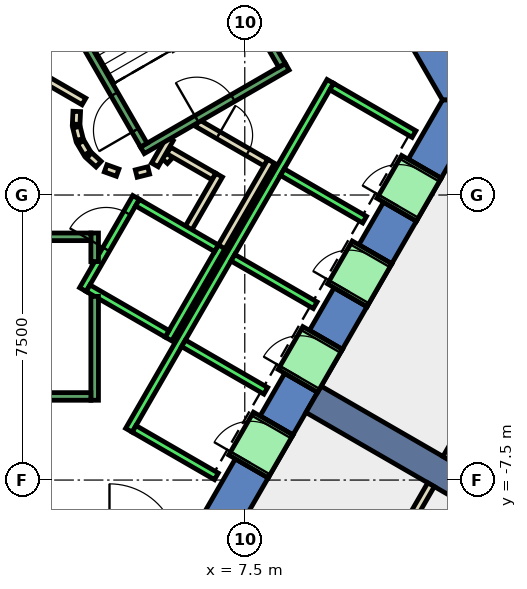
"""IFC4 building model, lengths in metres.
Left out: names, types, materials, properties, quantities, classifications, styles, units other than length and angle.
Written with IfcOpenShell. Run it as: python <this file> out.ifc"""

import sys

from ifc_helpers import new_model, si_unit, direction, frame, frame_2d, origin, place, context, subcontext, project, spatial, polyline, rectangle, outline, extrude, element, fill, save


model = new_model("IFC4")
c1 = context("Model", 3, precision=1e-05, world=origin(), true_north=direction((0.0, 1.0)))
c2 = subcontext(c1, "Body", "Model", "MODEL_VIEW")
j1 = project(units=[si_unit("LENGTHUNIT", "METRE"), si_unit("PLANEANGLEUNIT", "RADIAN")], contexts=[c1])
p1 = place(None, origin())
s1 = spatial("IfcSite", under=j1, at=p1, CompositionType="ELEMENT")
p2 = place(p1, origin())
s2 = spatial("IfcBuilding", under=s1, at=p2, CompositionType="ELEMENT")
p3 = place(p2, frame((0.0, 0.0, 68.6)))
s3 = spatial("IfcBuildingStorey", under=s2, at=p3, CompositionType="ELEMENT", Elevation=68.6)
p4 = place(p3, frame((0.0, 0.0, -0.4)))
e1 = element("IfcWall", 1, at=p4, inside=s3, PredefinedType="SHEAR", context=c2, shape_type="SweptSolid", body=[
    extrude(outline(polyline([(8.517, 11.748), (7.651, 11.248), (12.702, 2.5), (13.856, 2.5), (8.517, 11.748)])), origin(), (0.0, 0.0, 1.0), 4.2),
])
p5 = place(p3, frame((0.0, 0.0, -0.4)))
e2 = element("IfcWall", 2, at=p5, inside=s3, PredefinedType="SHEAR", context=c2, shape_type="SweptSolid", body=[
    extrude(outline(polyline([(8.117, -7.44), (7.252, -6.94), (6.351, -8.5), (6.928, -9.5), (8.117, -7.44)])), origin(), (0.0, 0.0, 1.0), 4.2),
])
p6 = place(p3, frame((0.0, 0.0, -0.4)))
e3 = element("IfcWall", 3, at=p6, inside=s3, PredefinedType="SHEAR", context=c2, shape_type="SweptSolid", body=[
    extrude(outline(polyline([(9.417, -5.189), (8.551, -4.689), (7.902, -5.814), (8.767, -6.314), (9.417, -5.189)])), origin(), (0.0, 0.0, 1.0), 4.2),
])
p7 = place(p3, frame((0.0, 0.0, -0.4)))
e4 = element("IfcWall", 4, at=p7, inside=s3, PredefinedType="SHEAR", context=c2, shape_type="SweptSolid", body=[
    extrude(outline(polyline([(10.717, -2.937), (9.851, -2.437), (9.201, -3.563), (10.067, -4.063), (10.717, -2.937)])), origin(), (0.0, 0.0, 1.0), 4.2),
])
p8 = place(p3, frame((0.0, 0.0, -0.4)))
e5 = element("IfcWall", 5, at=p8, inside=s3, PredefinedType="SHEAR", context=c2, shape_type="SweptSolid", body=[
    extrude(outline(polyline([(12.017, -0.686), (11.151, -0.186), (10.501, -1.311), (11.367, -1.811), (12.017, -0.686)])), origin(), (0.0, 0.0, 1.0), 4.2),
])
p9 = place(p3, frame((0.0, 0.0, -0.4)))
e6 = element("IfcWall", 6, at=p9, inside=s3, PredefinedType="SHEAR", context=c2, shape_type="SweptSolid", body=[
    extrude(outline(polyline([(11.801, 0.94), (12.667, 0.44), (13.856, 2.5), (12.702, 2.5), (11.801, 0.94)])), origin(), (0.0, 0.0, 1.0), 4.2),
])
p10 = place(p3, frame((0.0, 0.0, 3.6)))
e7 = element("IfcWall", 7, at=p10, inside=s3, PredefinedType="SHEAR", context=c2, shape_type="SweptSolid", body=[
    extrude(outline(polyline([(8.767, -6.314), (7.902, -5.814), (7.252, -6.94), (8.117, -7.44), (8.767, -6.314)])), origin(), (0.0, 0.0, 1.0), 0.2),
])
p11 = place(p3, frame((0.0, 0.0, 3.6)))
e8 = element("IfcWall", 8, at=p11, inside=s3, PredefinedType="SHEAR", context=c2, shape_type="SweptSolid", body=[
    extrude(outline(polyline([(10.067, -4.063), (9.201, -3.563), (8.551, -4.689), (9.417, -5.189), (10.067, -4.063)])), origin(), (0.0, 0.0, 1.0), 0.2),
])
p12 = place(p3, frame((0.0, 0.0, 3.6)))
e9 = element("IfcWall", 9, at=p12, inside=s3, PredefinedType="SHEAR", context=c2, shape_type="SweptSolid", body=[
    extrude(outline(polyline([(11.367, -1.811), (10.501, -1.311), (9.851, -2.437), (10.717, -2.937), (11.367, -1.811)])), origin(), (0.0, 0.0, 1.0), 0.2),
])
p13 = place(p3, frame((0.0, 0.0, 3.6)))
e10 = element("IfcWall", 10, at=p13, inside=s3, PredefinedType="SHEAR", context=c2, shape_type="SweptSolid", body=[
    extrude(outline(polyline([(12.667, 0.44), (11.801, 0.94), (11.151, -0.186), (12.017, -0.686), (12.667, 0.44)])), origin(), (0.0, 0.0, 1.0), 0.2),
])
p14 = place(p3, frame((9.31, -5.375, -0.4), z_axis=(0.0, 0.0, 1.0), x_axis=(0.866017533419, -0.500013631625, 0.0)))
e11 = element("IfcWall", 11, at=p14, inside=s3, PredefinedType="SHEAR", context=c2, shape_type="SweptSolid", body=[
    extrude(rectangle(XDim=9.0, YDim=0.8, at=frame_2d((4.5, 0.0))), origin(), (0.0, 0.0, 1.0), 4.2),
])
p15 = place(p3, frame((5.39, 0.898, 0.0), z_axis=(0.0, 0.0, 1.0), x_axis=(0.673828488714, 0.738887791073, 0.0)))
e12 = element("IfcWall", 12, at=p15, inside=s3, PredefinedType="PARTITIONING", context=c2, shape_type="SweptSolid", body=[
    extrude(rectangle(XDim=0.263, YDim=0.2, at=frame_2d((0.131, 0.0))), origin(), (0.0, 0.0, 1.0), 3.8),
])
p16 = place(p3, frame((5.499, 1.172, 0.0), z_axis=(0.0, 0.0, 1.0), x_axis=(0.866333505267, -0.499465972466, 0.0)))
e13 = element("IfcWall", 13, at=p16, inside=s3, PredefinedType="PARTITIONING", context=c2, shape_type="SweptSolid", body=[
    extrude(rectangle(XDim=1.374, YDim=0.2, at=frame_2d((0.687, 0.0))), origin(), (0.0, 0.0, 1.0), 3.8),
])
p17 = place(p3, frame((6.826, 0.522, 0.0), z_axis=(0.0, 0.0, 1.0), x_axis=(-0.500016722714, -0.866015748706, 0.0)))
e14 = element("IfcWall", 14, at=p17, inside=s3, PredefinedType="PARTITIONING", context=c2, shape_type="SweptSolid", body=[
    extrude(rectangle(XDim=1.7, YDim=0.2, at=frame_2d((0.85, 0.0))), origin(), (0.0, 0.0, 1.0), 3.8),
])
p18 = place(p3, frame((6.25, 1.894, 0.0), z_axis=(0.0, 0.0, 1.0), x_axis=(0.866043184279, -0.499969202016, 0.0)))
e15 = element("IfcWall", 15, at=p18, inside=s3, PredefinedType="PARTITIONING", context=c2, shape_type="SweptSolid", body=[
    extrude(rectangle(XDim=2.084, YDim=0.2, at=frame_2d((1.042, 0.0))), origin(), (0.0, 0.0, 1.0), 3.8),
])
p19 = place(p18, frame((0.642, 0.0, 0.0)))
e16 = element("IfcOpeningElement", 16, at=p19, cuts=e15, PredefinedType="OPENING", context=c2, shape_type="SweptSolid", body=[
    extrude(rectangle(XDim=0.9, YDim=2.1, at=frame_2d((0.45, 1.05))), frame((0.0, 0.11, 0.0), z_axis=(0.0, -1.0, 0.0), x_axis=(1.0, 0.0, 0.0)), (0.0, 0.0, 1.0), 0.22),
])
p20 = place(p3, frame((8.192, 0.888, 0.0), z_axis=(0.0, 0.0, 1.0), x_axis=(-0.499940625693, -0.866059680843, 0.0)))
e17 = element("IfcWall", 17, at=p20, inside=s3, PredefinedType="PARTITIONING", context=c2, shape_type="SweptSolid", body=[
    extrude(rectangle(XDim=2.68, YDim=0.2, at=frame_2d((1.34, 0.0))), origin(), (0.0, 0.0, 1.0), 3.8),
])
p21 = place(p3, frame((5.135, 0.793, 0.0), z_axis=(0.0, 0.0, 1.0), x_axis=(0.499526442893, 0.866298639529, 0.0)))
e18 = element("IfcWall", 18, at=p21, inside=s3, PredefinedType="PARTITIONING", context=c2, shape_type="SweptSolid", body=[
    extrude(rectangle(XDim=0.791, YDim=0.2, at=frame_2d((0.396, 0.0))), origin(), (0.0, 0.0, 1.0), 3.8),
])
p22 = place(p3, frame((2.012, 3.186, 0.0), z_axis=(0.0, 0.0, 1.0), x_axis=(0.865891012941, -0.500232699559, 0.0)))
e19 = element("IfcWall", 19, at=p22, inside=s3, PredefinedType="PARTITIONING", context=c2, shape_type="SweptSolid", body=[
    extrude(rectangle(XDim=1.449, YDim=0.2, at=frame_2d((0.725, 0.0))), origin(), (0.0, 0.0, 1.0), 3.8),
])
p23 = place(p3, frame((3.079, 2.199, 0.0), z_axis=(0.0, 0.0, 1.0), x_axis=(-0.047771483479, -0.998858290933, 0.0)))
e20 = element("IfcWall", 20, at=p23, inside=s3, PredefinedType="PARTITIONING", context=c2, shape_type="SweptSolid", body=[
    extrude(rectangle(XDim=0.337, YDim=0.2, at=frame_2d((0.169, 0.0))), origin(), (0.0, 0.0, 1.0), 3.8),
])
p24 = place(p3, frame((3.07, 1.786, 0.0), z_axis=(0.0, 0.0, 1.0), x_axis=(0.242705583207, -0.970099994784, 0.0)))
e21 = element("IfcWall", 21, at=p24, inside=s3, PredefinedType="PARTITIONING", context=c2, shape_type="SweptSolid", body=[
    extrude(rectangle(XDim=0.338, YDim=0.2, at=frame_2d((0.169, 0.0))), origin(), (0.0, 0.0, 1.0), 3.8),
])
for number, where, z_axis, x_axis in (
    (22, (3.182, 1.388, 0.0), (0.0, 0.0, 1.0), (0.512, -0.859, 0.0)),
    (23, (3.404, 1.039, 0.0), (0.0, 0.0, 1.0), (0.74, -0.672, 0.0)),
):
    element("IfcWall", number, at=place(p3, frame(where, z_axis=z_axis, x_axis=x_axis)), inside=s3, PredefinedType="PARTITIONING", context=c2, shape_type="SweptSolid", body=[
        extrude(rectangle(XDim=0.338, YDim=0.2, at=frame_2d((0.169, 0.0))), origin(), (0.0, 0.0, 1.0), 3.8),
    ])
p25 = place(p3, frame((3.838, 0.702, 0.0), z_axis=(0.0, 0.0, 1.0), x_axis=(0.941035081519, -0.338308993895, 0.0)))
e24 = element("IfcWall", 24, at=p25, inside=s3, PredefinedType="PARTITIONING", context=c2, shape_type="SweptSolid", body=[
    extrude(rectangle(XDim=0.337, YDim=0.2, at=frame_2d((0.168, 0.0))), origin(), (0.0, 0.0, 1.0), 3.8),
])
p26 = place(p3, frame((4.644, 0.564, 0.0), z_axis=(0.0, 0.0, 1.0), x_axis=(0.969929076366, 0.243387729394, 0.0)))
e25 = element("IfcWall", 25, at=p26, inside=s3, PredefinedType="PARTITIONING", context=c2, shape_type="SweptSolid", body=[
    extrude(rectangle(XDim=0.337, YDim=0.2, at=frame_2d((0.168, 0.0))), origin(), (0.0, 0.0, 1.0), 3.8),
])
p27 = place(p3, frame((19.81, 5.211, 0.0), z_axis=(0.0, 0.0, 1.0), x_axis=(-0.500003368273, -0.866023459102, 0.0)))
e26 = element("IfcWall", 26, at=p27, inside=s3, PredefinedType="PARTITIONING", context=c2, shape_type="SweptSolid", body=[
    extrude(rectangle(XDim=14.018, YDim=0.2, at=frame_2d((7.009, 0.0))), origin(), (0.0, 0.0, 1.0), 3.8),
])
p28 = place(p3, frame((12.401, -7.622, 0.0), z_axis=(0.0, 0.0, 1.0), x_axis=(-0.500029185841, -0.866008552675, 0.0)))
e27 = element("IfcWall", 27, at=p28, inside=s3, PredefinedType="PARTITIONING", context=c2, shape_type="SweptSolid", body=[
    extrude(rectangle(XDim=9.301, YDim=0.2, at=frame_2d((4.651, 0.0))), origin(), (0.0, 0.0, 1.0), 3.8),
])
p29 = place(p3, frame((3.24, -2.488, 0.0), z_axis=(0.0, 0.0, 1.0), x_axis=(0.49994636267, 0.866056369097, 0.0)))
e28 = element("IfcWall", 28, at=p29, inside=s3, PredefinedType="STANDARD", context=c2, shape_type="SweptSolid", body=[
    extrude(rectangle(XDim=2.8, YDim=0.2, at=frame_2d((1.4, 0.0))), origin(), (0.0, 0.0, 1.0), 3.8),
])
p30 = place(p29, frame((1.225, 0.0, 0.0)))
e29 = element("IfcOpeningElement", 29, at=p30, cuts=e28, PredefinedType="OPENING", context=c2, shape_type="SweptSolid", body=[
    extrude(rectangle(XDim=1.1, YDim=2.1, at=frame_2d((0.55, 1.05))), frame((0.0, 0.11, 0.0), z_axis=(0.0, -1.0, 0.0), x_axis=(1.0, 0.0, 0.0)), (0.0, 0.0, 1.0), 0.22),
])
p31 = place(p3, frame((5.492, -3.788, 0.0), z_axis=(0.0, 0.0, 1.0), x_axis=(0.500011755427, 0.866018616679, 0.0)))
e30 = element("IfcWall", 30, at=p31, inside=s3, PredefinedType="STANDARD", context=c2, shape_type="SweptSolid", body=[
    extrude(rectangle(XDim=2.8, YDim=0.2, at=frame_2d((1.4, 0.0))), origin(), (0.0, 0.0, 1.0), 3.8),
])
p32 = place(p3, frame((3.377, -2.452, 0.0), z_axis=(0.0, 0.0, 1.0), x_axis=(0.865955154139, -0.50012165622, 0.0)))
e31 = element("IfcWall", 31, at=p32, inside=s3, PredefinedType="STANDARD", context=c2, shape_type="SweptSolid", body=[
    extrude(rectangle(XDim=2.4, YDim=0.2, at=frame_2d((1.2, 0.0))), origin(), (0.0, 0.0, 1.0), 3.8),
])
p33 = place(p3, frame((4.677, -0.2, 0.0), z_axis=(0.0, 0.0, 1.0), x_axis=(0.865973769406, -0.500089422704, 0.0)))
e32 = element("IfcWall", 32, at=p33, inside=s3, PredefinedType="STANDARD", context=c2, shape_type="SweptSolid", body=[
    extrude(rectangle(XDim=2.399, YDim=0.2, at=frame_2d((1.2, 0.0))), origin(), (0.0, 0.0, 1.0), 3.8),
])
p34 = place(p3, frame((4.451, -6.19, 0.0), z_axis=(0.0, 0.0, 1.0), x_axis=(0.50000090737, 0.866024879913, 0.0)))
e33 = element("IfcWall", 33, at=p34, inside=s3, PredefinedType="STANDARD", context=c2, shape_type="SweptSolid", body=[
    extrude(rectangle(XDim=10.6, YDim=0.2, at=frame_2d((5.3, 0.0))), origin(), (0.0, 0.0, 1.0), 3.8),
])
for number, where, z_axis, x_axis in (
    (34, (4.588, -6.153, 0.0), (0.0, 0.0, 1.0), (0.866, -0.5, 0.0)),
    (35, (5.888, -3.902, 0.0), (0.0, 0.0, 1.0), (0.866, -0.5, 0.0)),
    (36, (7.188, -1.65, 0.0), (0.0, 0.0, 1.0), (0.866, -0.5, 0.0)),
    (37, (8.488, 0.602, 0.0), (0.0, 0.0, 1.0), (0.866, -0.5, 0.0)),
):
    element("IfcWall", number, at=place(p3, frame(where, z_axis=z_axis, x_axis=x_axis)), inside=s3, PredefinedType="STANDARD", context=c2, shape_type="SweptSolid", body=[
        extrude(rectangle(XDim=2.5, YDim=0.2, at=frame_2d((1.25, 0.0))), origin(), (0.0, 0.0, 1.0), 3.8),
    ])
p35 = place(p3, frame((9.788, 2.853, 0.0), z_axis=(0.0, 0.0, 1.0), x_axis=(0.865998541277, -0.500046524342, 0.0)))
e38 = element("IfcWall", 38, at=p35, inside=s3, PredefinedType="STANDARD", context=c2, shape_type="SweptSolid", body=[
    extrude(rectangle(XDim=2.5, YDim=0.2, at=frame_2d((1.25, 0.0))), origin(), (0.0, 0.0, 1.0), 3.8),
])
p36 = place(p3, frame((7.598, -7.14, 0.0), z_axis=(0.0, 0.0, 1.0), x_axis=(0.500362116554, 0.865816234728, 0.0)))
e39 = element("IfcWall", 39, at=p36, inside=s3, PredefinedType="STANDARD", context=c2, shape_type="SweptSolid", body=[
    extrude(rectangle(XDim=1.299, YDim=1.2, at=frame_2d((0.65, 0.0))), origin(), (0.0, 0.0, 1.0), 2.4),
])
p37 = place(p36, frame((0.1, 0.0, 0.0)))
e40 = element("IfcOpeningElement", 40, at=p37, cuts=e39, PredefinedType="OPENING", context=c2, shape_type="SweptSolid", body=[
    extrude(rectangle(XDim=1.1, YDim=2.3, at=frame_2d((0.55, 1.15))), frame((0.0, 0.61, 0.0), z_axis=(0.0, -1.0, 0.0), x_axis=(1.0, 0.0, 0.0)), (0.0, 0.0, 1.0), 1.22),
])
p38 = place(p3, frame((8.898, -4.889, 0.0), z_axis=(0.0, 0.0, 1.0), x_axis=(0.500036693733, 0.866004217611, 0.0)))
e41 = element("IfcWall", 41, at=p38, inside=s3, PredefinedType="STANDARD", context=c2, shape_type="SweptSolid", body=[
    extrude(rectangle(XDim=1.3, YDim=1.2, at=frame_2d((0.65, 0.0))), origin(), (0.0, 0.0, 1.0), 2.4),
])
p39 = place(p38, frame((0.1, 0.0, 0.0)))
e42 = element("IfcOpeningElement", 42, at=p39, cuts=e41, PredefinedType="OPENING", context=c2, shape_type="SweptSolid", body=[
    extrude(rectangle(XDim=1.1, YDim=2.3, at=frame_2d((0.55, 1.15))), frame((0.0, 0.61, 0.0), z_axis=(0.0, -1.0, 0.0), x_axis=(1.0, 0.0, 0.0)), (0.0, 0.0, 1.0), 1.22),
])
p40 = place(p3, frame((10.198, -2.637, 0.0), z_axis=(0.0, 0.0, 1.0), x_axis=(0.49989585183, 0.866085525409, 0.0)))
e43 = element("IfcWall", 43, at=p40, inside=s3, PredefinedType="STANDARD", context=c2, shape_type="SweptSolid", body=[
    extrude(rectangle(XDim=1.3, YDim=1.2, at=frame_2d((0.65, 0.0))), origin(), (0.0, 0.0, 1.0), 2.4),
])
p41 = place(p40, frame((0.1, 0.0, 0.0)))
e44 = element("IfcOpeningElement", 44, at=p41, cuts=e43, PredefinedType="OPENING", context=c2, shape_type="SweptSolid", body=[
    extrude(rectangle(XDim=1.1, YDim=2.3, at=frame_2d((0.55, 1.15))), frame((0.0, 0.61, 0.0), z_axis=(0.0, -1.0, 0.0), x_axis=(1.0, 0.0, 0.0)), (0.0, 0.0, 1.0), 1.22),
])
p42 = place(p3, frame((11.498, -0.385, 0.0), z_axis=(0.0, 0.0, 1.0), x_axis=(0.500221244143, 0.865897630733, 0.0)))
e45 = element("IfcWall", 45, at=p42, inside=s3, PredefinedType="STANDARD", context=c2, shape_type="SweptSolid", body=[
    extrude(rectangle(XDim=1.299, YDim=1.2, at=frame_2d((0.65, 0.0))), origin(), (0.0, 0.0, 1.0), 2.4),
])
p43 = place(p42, frame((0.1, 0.0, 0.0)))
e46 = element("IfcOpeningElement", 46, at=p43, cuts=e45, PredefinedType="OPENING", context=c2, shape_type="SweptSolid", body=[
    extrude(rectangle(XDim=1.1, YDim=2.3, at=frame_2d((0.55, 1.15))), frame((0.0, 0.61, 0.0), z_axis=(0.0, -1.0, 0.0), x_axis=(1.0, 0.0, 0.0)), (0.0, 0.0, 1.0), 1.22),
])
p44 = place(p3, frame((3.55, -2.667, 0.0), z_axis=(0.0, 0.0, 1.0), x_axis=(0.0, -1.0, 0.0)))
e47 = element("IfcWall", 47, at=p44, inside=s3, PredefinedType="STANDARD", context=c2, shape_type="SweptSolid", body=[
    extrude(rectangle(XDim=2.733, YDim=0.2, at=frame_2d((1.366, 0.0))), origin(), (0.0, 0.0, 1.0), 3.8),
])
p45 = place(p3, frame((3.55, -1.0, 0.0), z_axis=(0.0, 0.0, 1.0), x_axis=(0.0, -1.0, 0.0)))
e48 = element("IfcWall", 48, at=p45, inside=s3, PredefinedType="STANDARD", context=c2, shape_type="SweptSolid", body=[
    extrude(rectangle(XDim=0.751, YDim=0.2, at=frame_2d((0.375, 0.0))), origin(), (0.0, 0.0, 1.0), 3.8),
])
p46 = place(p3, frame((-3.45, -1.1, 0.0), z_axis=(0.0, 0.0, 1.0), x_axis=(1.0, 0.0, 0.0)))
e49 = element("IfcWall", 49, at=p46, inside=s3, PredefinedType="STANDARD", context=c2, shape_type="SweptSolid", body=[
    extrude(rectangle(XDim=6.9, YDim=0.2, at=frame_2d((3.45, 0.0))), origin(), (0.0, 0.0, 1.0), 3.8),
])
p47 = place(p46, frame((0.45, 0.0, 0.0)))
e50 = element("IfcOpeningElement", 50, at=p47, cuts=e49, PredefinedType="OPENING", context=c2, shape_type="SweptSolid", body=[
    extrude(rectangle(XDim=1.1, YDim=2.2, at=frame_2d((0.55, 1.1))), frame((0.0, 0.11, 0.0), z_axis=(0.0, -1.0, 0.0), x_axis=(1.0, 0.0, 0.0)), (0.0, 0.0, 1.0), 0.22),
])
p48 = place(p3, frame((-3.45, -5.3, 0.0), z_axis=(0.0, 0.0, 1.0), x_axis=(1.0, 0.0, 0.0)))
e51 = element("IfcWall", 51, at=p48, inside=s3, PredefinedType="STANDARD", context=c2, shape_type="SweptSolid", body=[
    extrude(rectangle(XDim=6.9, YDim=0.2, at=frame_2d((3.45, 0.0))), origin(), (0.0, 0.0, 1.0), 3.8),
])
p49 = place(p3, frame((4.806, 1.176, 0.0), z_axis=(0.0, 0.0, 1.0), x_axis=(0.866059941101, 0.499940174841, 0.0)))
e52 = element("IfcWall", 52, at=p49, inside=s3, PredefinedType="STANDARD", context=c2, shape_type="SweptSolid", body=[
    extrude(rectangle(XDim=4.4, YDim=0.2, at=frame_2d((2.2, 0.0))), origin(), (0.0, 0.0, 1.0), 3.8),
])
p50 = place(p49, frame((1.65, 0.0, 0.0)))
e53 = element("IfcOpeningElement", 53, at=p50, cuts=e52, PredefinedType="OPENING", context=c2, shape_type="SweptSolid", body=[
    extrude(rectangle(XDim=1.1, YDim=2.2, at=frame_2d((0.55, 1.1))), frame((0.0, 0.11, 0.0), z_axis=(0.0, -1.0, 0.0), x_axis=(1.0, 0.0, 0.0)), (0.0, 0.0, 1.0), 0.22),
])
p51 = place(p3, frame((4.843, 1.312, 0.0), z_axis=(0.0, 0.0, 1.0), x_axis=(-0.499963383562, 0.866046543262, 0.0)))
e54 = element("IfcWall", 54, at=p51, inside=s3, PredefinedType="STANDARD", context=c2, shape_type="SweptSolid", body=[
    extrude(rectangle(XDim=6.9, YDim=0.2, at=frame_2d((3.45, 0.0))), origin(), (0.0, 0.0, 1.0), 3.8),
])
p52 = place(p51, frame((0.45, 0.0, 0.0)))
e55 = element("IfcOpeningElement", 55, at=p52, cuts=e54, PredefinedType="OPENING", context=c2, shape_type="SweptSolid", body=[
    extrude(rectangle(XDim=1.1, YDim=2.2, at=frame_2d((0.55, 1.1))), frame((0.0, 0.11, 0.0), z_axis=(0.0, -1.0, 0.0), x_axis=(1.0, 0.0, 0.0)), (0.0, 0.0, 1.0), 0.22),
])
p53 = place(p3, frame((8.48, 3.412, 0.0), z_axis=(0.0, 0.0, 1.0), x_axis=(-0.499978703459, 0.866037698999, 0.0)))
e56 = element("IfcWall", 56, at=p53, inside=s3, PredefinedType="STANDARD", context=c2, shape_type="SweptSolid", body=[
    extrude(rectangle(XDim=6.9, YDim=0.2, at=frame_2d((3.45, 0.0))), origin(), (0.0, 0.0, 1.0), 3.8),
])
p54 = place(p19, origin())
e57 = element("IfcDoor", 57, at=p54, inside=s3, OperationType="SINGLE_SWING_LEFT", PredefinedType="DOOR", context=c2, shape_type="SweptSolid", body=[
    extrude(rectangle(XDim=0.9, YDim=2.1, at=frame_2d((0.45, 1.05))), frame((0.0, 0.025, 0.0), z_axis=(0.0, -1.0, 0.0), x_axis=(1.0, 0.0, 0.0)), (0.0, 0.0, 1.0), 0.05),
])
fill(e16, e57)
p55 = place(p37, origin())
e58 = element("IfcDoor", 58, at=p55, inside=s3, OperationType="SLIDING_TO_LEFT", PredefinedType="DOOR", context=c2, shape_type="SweptSolid", body=[
    extrude(rectangle(XDim=1.1, YDim=2.3, at=frame_2d((0.55, 1.15))), frame((0.0, 0.025, 0.0), z_axis=(0.0, -1.0, 0.0), x_axis=(1.0, 0.0, 0.0)), (0.0, 0.0, 1.0), 0.05),
])
fill(e40, e58)
p56 = place(p39, origin())
e59 = element("IfcDoor", 59, at=p56, inside=s3, OperationType="SLIDING_TO_LEFT", PredefinedType="DOOR", context=c2, shape_type="SweptSolid", body=[
    extrude(rectangle(XDim=1.1, YDim=2.3, at=frame_2d((0.55, 1.15))), frame((0.0, 0.025, 0.0), z_axis=(0.0, -1.0, 0.0), x_axis=(1.0, 0.0, 0.0)), (0.0, 0.0, 1.0), 0.05),
])
fill(e42, e59)
p57 = place(p41, origin())
e60 = element("IfcDoor", 60, at=p57, inside=s3, OperationType="SLIDING_TO_LEFT", PredefinedType="DOOR", context=c2, shape_type="SweptSolid", body=[
    extrude(rectangle(XDim=1.1, YDim=2.3, at=frame_2d((0.55, 1.15))), frame((0.0, 0.025, 0.0), z_axis=(0.0, -1.0, 0.0), x_axis=(1.0, 0.0, 0.0)), (0.0, 0.0, 1.0), 0.05),
])
fill(e44, e60)
p58 = place(p43, origin())
e61 = element("IfcDoor", 61, at=p58, inside=s3, OperationType="SLIDING_TO_LEFT", PredefinedType="DOOR", context=c2, shape_type="SweptSolid", body=[
    extrude(rectangle(XDim=1.1, YDim=2.3, at=frame_2d((0.55, 1.15))), frame((0.0, 0.025, 0.0), z_axis=(0.0, -1.0, 0.0), x_axis=(1.0, 0.0, 0.0)), (0.0, 0.0, 1.0), 0.05),
])
fill(e46, e61)
p59 = place(p30, origin())
e62 = element("IfcDoor", 62, at=p59, inside=s3, OperationType="SLIDING_TO_LEFT", PredefinedType="DOOR", context=c2, shape_type="SweptSolid", body=[
    extrude(rectangle(XDim=1.1, YDim=2.1, at=frame_2d((0.55, 1.05))), frame((0.0, 0.025, 0.0), z_axis=(0.0, -1.0, 0.0), x_axis=(1.0, 0.0, 0.0)), (0.0, 0.0, 1.0), 0.05),
])
fill(e29, e62)
p60 = place(p52, origin())
e63 = element("IfcDoor", 63, at=p60, inside=s3, OperationType="SINGLE_SWING_LEFT", PredefinedType="DOOR", context=c2, shape_type="SweptSolid", body=[
    extrude(rectangle(XDim=1.1, YDim=2.2, at=frame_2d((0.55, 1.1))), frame((0.0, 0.025, 0.0), z_axis=(0.0, -1.0, 0.0), x_axis=(1.0, 0.0, 0.0)), (0.0, 0.0, 1.0), 0.05),
])
fill(e55, e63)
p61 = place(p50, origin())
e64 = element("IfcDoor", 64, at=p61, inside=s3, OperationType="SINGLE_SWING_LEFT", PredefinedType="DOOR", context=c2, shape_type="SweptSolid", body=[
    extrude(rectangle(XDim=1.1, YDim=2.2, at=frame_2d((0.55, 1.1))), frame((0.0, 0.025, 0.0), z_axis=(0.0, -1.0, 0.0), x_axis=(1.0, 0.0, 0.0)), (0.0, 0.0, 1.0), 0.05),
])
fill(e53, e64)
save(model, sys.argv[1])
